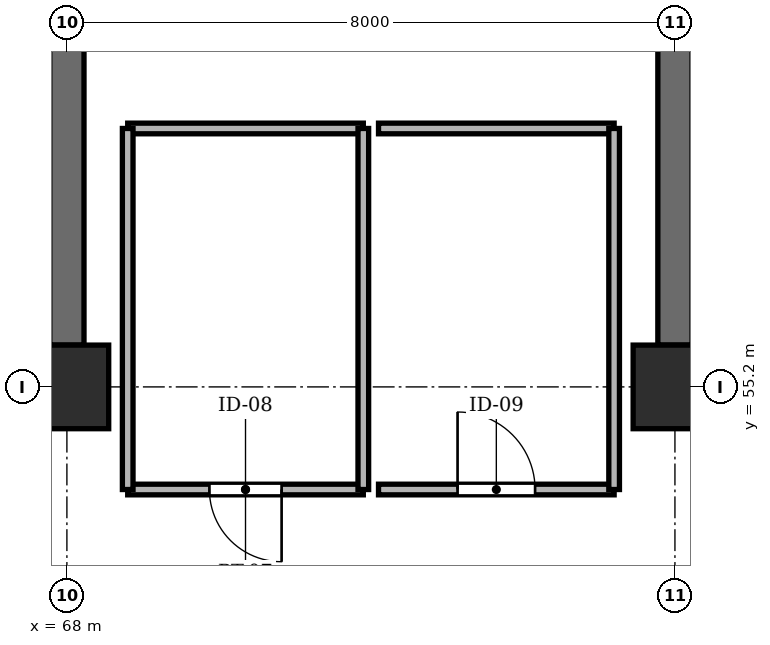
"""IFC4 building model, lengths in metres.
Left out: names, types, materials, properties, quantities, classifications, styles, units other than length and angle.
Written with IfcOpenShell. Run it as: python <this file> out.ifc"""

import sys

from ifc_helpers import new_model, si_unit, direction, frame, frame_2d, origin, origin_2d, place, context, subcontext, project, spatial, rectangle, extrude, element, fill, save


model = new_model("IFC4")
c1 = context("Model", 3, precision=1e-05, world=origin(), true_north=direction((0.0, 1.0)))
c2 = subcontext(c1, "Body", "Model", "MODEL_VIEW")
j1 = project(units=[si_unit("LENGTHUNIT", "METRE"), si_unit("PLANEANGLEUNIT", "RADIAN")], contexts=[c1])
p1 = place(None, origin())
s1 = spatial("IfcSite", under=j1, at=p1, CompositionType="ELEMENT")
p2 = place(p1, origin())
s2 = spatial("IfcBuilding", under=s1, at=p2, CompositionType="ELEMENT")
p3 = place(p2, frame((0.0, 0.0, 27.55)))
s3 = spatial("IfcBuildingStorey", under=s2, at=p3, CompositionType="ELEMENT", Elevation=27.55)
for number, where, z_axis, x_axis in (
    (1, (68.0, 55.2, -0.26), (0.0, 0.0, 1.0), (1.0, 0.0, 0.0)),
    (2, (76.0, 55.2, -0.26), (0.0, 0.0, 1.0), (1.0, 0.0, 0.0)),
):
    element("IfcColumn", number, at=place(p3, frame(where, z_axis=z_axis, x_axis=x_axis)), inside=s3, PredefinedType="COLUMN", context=c2, shape_type="SweptSolid", body=[
        extrude(rectangle(XDim=1.1, YDim=1.1, at=origin_2d()), origin(), (0.0, 0.0, 1.0), 3.25),
    ])
for number, where, z_axis, x_axis in (
    (3, (68.0, 55.75, 0.0), (0.0, 0.0, 1.0), (0.0, 1.0, 0.0)),
    (4, (76.0, 55.75, 0.0), (0.0, 0.0, 1.0), (0.0, 1.0, 0.0)),
):
    element("IfcWall", number, at=place(p3, frame(where, z_axis=z_axis, x_axis=x_axis)), inside=s3, PredefinedType="SHEAR", context=c2, shape_type="SweptSolid", body=[
        extrude(rectangle(XDim=6.2, YDim=0.45, at=frame_2d((3.1, 0.0))), origin(), (0.0, 0.0, 1.0), 2.99),
    ])
p4 = place(p3, frame((68.8, 53.85, 0.0), z_axis=(0.0, 0.0, 1.0), x_axis=(1.0, 0.0, 0.0)))
e5 = element("IfcWall", 5, at=p4, inside=s3, PredefinedType="PARTITIONING", context=c2, shape_type="SweptSolid", body=[
    extrude(rectangle(XDim=3.1, YDim=0.14, at=frame_2d((1.55, 0.0))), origin(), (0.0, 0.0, 1.0), 2.53),
])
p5 = place(p4, frame((1.075, 0.0, 0.0)))
e6 = element("IfcOpeningElement", 6, at=p5, cuts=e5, PredefinedType="OPENING", context=c2, shape_type="SweptSolid", body=[
    extrude(rectangle(XDim=0.95, YDim=2.1, at=frame_2d((0.475, 1.05))), frame((0.0, 0.082, 0.0), z_axis=(0.0, -1.0, 0.0), x_axis=(1.0, 0.0, 0.0)), (0.0, 0.0, 1.0), 0.164),
])
p6 = place(p3, frame((68.8, 58.6, 0.0), z_axis=(0.0, 0.0, 1.0), x_axis=(1.0, 0.0, 0.0)))
e7 = element("IfcWall", 7, at=p6, inside=s3, PredefinedType="PARTITIONING", context=c2, shape_type="SweptSolid", body=[
    extrude(rectangle(XDim=3.1, YDim=0.14, at=frame_2d((1.55, 0.0))), origin(), (0.0, 0.0, 1.0), 2.53),
])
for number, where, z_axis, x_axis in (
    (8, (68.8, 53.85, 0.0), (0.0, 0.0, 1.0), (0.0, 1.0, 0.0)),
    (9, (71.9, 53.85, 0.0), (0.0, 0.0, 1.0), (0.0, 1.0, 0.0)),
):
    element("IfcWall", number, at=place(p3, frame(where, z_axis=z_axis, x_axis=x_axis)), inside=s3, PredefinedType="PARTITIONING", context=c2, shape_type="SweptSolid", body=[
        extrude(rectangle(XDim=4.75, YDim=0.14, at=frame_2d((2.375, 0.0))), origin(), (0.0, 0.0, 1.0), 2.53),
    ])
p7 = place(p3, frame((72.1, 53.85, 0.0), z_axis=(0.0, 0.0, 1.0), x_axis=(1.0, 0.0, 0.0)))
e10 = element("IfcWall", 10, at=p7, inside=s3, PredefinedType="PARTITIONING", context=c2, shape_type="SweptSolid", body=[
    extrude(rectangle(XDim=3.1, YDim=0.14, at=frame_2d((1.55, 0.0))), origin(), (0.0, 0.0, 1.0), 2.53),
])
p8 = place(p7, frame((1.04, 0.0, 0.0)))
e11 = element("IfcOpeningElement", 11, at=p8, cuts=e10, PredefinedType="OPENING", context=c2, shape_type="SweptSolid", body=[
    extrude(rectangle(XDim=1.02, YDim=2.1, at=frame_2d((0.51, 1.05))), frame((0.0, 0.082, 0.0), z_axis=(0.0, -1.0, 0.0), x_axis=(1.0, 0.0, 0.0)), (0.0, 0.0, 1.0), 0.164),
])
p9 = place(p3, frame((72.1, 58.6, 0.0), z_axis=(0.0, 0.0, 1.0), x_axis=(1.0, 0.0, 0.0)))
e12 = element("IfcWall", 12, at=p9, inside=s3, PredefinedType="PARTITIONING", context=c2, shape_type="SweptSolid", body=[
    extrude(rectangle(XDim=3.1, YDim=0.14, at=frame_2d((1.55, 0.0))), origin(), (0.0, 0.0, 1.0), 2.53),
])
p10 = place(p3, frame((75.2, 53.85, 0.0), z_axis=(0.0, 0.0, 1.0), x_axis=(0.0, 1.0, 0.0)))
e13 = element("IfcWall", 13, at=p10, inside=s3, PredefinedType="PARTITIONING", context=c2, shape_type="SweptSolid", body=[
    extrude(rectangle(XDim=4.75, YDim=0.14, at=frame_2d((2.375, 0.0))), origin(), (0.0, 0.0, 1.0), 2.53),
])
p11 = place(p5, frame((0.95, 0.0, 0.0), z_axis=(0.0, 0.0, 1.0), x_axis=(-1.0, 0.0, 0.0)))
e14 = element("IfcDoor", 14, at=p11, inside=s3, OperationType="SINGLE_SWING_RIGHT", PredefinedType="DOOR", context=c2, shape_type="SweptSolid", body=[
    extrude(rectangle(XDim=0.95, YDim=2.1, at=frame_2d((0.475, 1.05))), frame((0.0, 0.025, 0.0), z_axis=(0.0, -1.0, 0.0), x_axis=(1.0, 0.0, 0.0)), (0.0, 0.0, 1.0), 0.05),
])
fill(e6, e14)
p12 = place(p8, origin())
e15 = element("IfcDoor", 15, at=p12, inside=s3, OperationType="SINGLE_SWING_LEFT", PredefinedType="DOOR", context=c2, shape_type="SweptSolid", body=[
    extrude(rectangle(XDim=1.02, YDim=2.1, at=frame_2d((0.51, 1.05))), frame((0.0, 0.025, 0.0), z_axis=(0.0, -1.0, 0.0), x_axis=(1.0, 0.0, 0.0)), (0.0, 0.0, 1.0), 0.05),
])
fill(e11, e15)
save(model, sys.argv[1])
